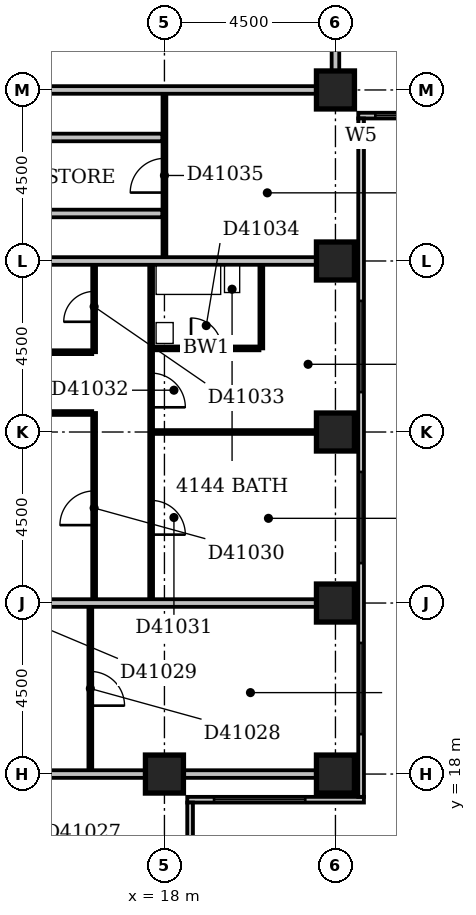
"""IFC4 building model, lengths in metres.
Left out: names, types, materials, properties, quantities, classifications, styles, units other than length and angle.
Written with IfcOpenShell. Run it as: python <this file> out.ifc"""

import sys

from ifc_helpers import new_model, si_unit, direction, frame, frame_2d, origin, origin_2d, place, context, subcontext, project, spatial, rectangle, extrude, element, fill, save


model = new_model("IFC4")
c1 = context("Model", 3, precision=1e-05, world=origin(), true_north=direction((0.0, 1.0)))
c2 = subcontext(c1, "Body", "Model", "MODEL_VIEW")
j1 = project(units=[si_unit("LENGTHUNIT", "METRE"), si_unit("PLANEANGLEUNIT", "RADIAN")], contexts=[c1])
p1 = place(None, origin())
s1 = spatial("IfcSite", under=j1, at=p1, CompositionType="ELEMENT")
p2 = place(p1, origin())
s2 = spatial("IfcBuilding", under=s1, at=p2, CompositionType="ELEMENT")
p3 = place(p2, frame((0.0, 0.0, 162.8)))
s3 = spatial("IfcBuildingStorey", under=s2, at=p3, CompositionType="ELEMENT", Elevation=162.8)
for number, where, z_axis, x_axis in (
    (1, (18.0, 18.0, -0.3), (0.0, 0.0, 1.0), (1.0, 0.0, 0.0)),
    (2, (22.5, 18.0, -0.3), (0.0, 0.0, 1.0), (1.0, 0.0, 0.0)),
    (3, (22.5, 22.5, -0.3), (0.0, 0.0, 1.0), (1.0, 0.0, 0.0)),
    (4, (22.5, 27.0, -0.3), (0.0, 0.0, 1.0), (1.0, 0.0, 0.0)),
    (5, (22.5, 31.5, -0.3), (0.0, 0.0, 1.0), (1.0, 0.0, 0.0)),
    (6, (22.5, 36.0, -0.3), (0.0, 0.0, 1.0), (1.0, 0.0, 0.0)),
):
    element("IfcColumn", number, at=place(p3, frame(where, z_axis=z_axis, x_axis=x_axis)), inside=s3, PredefinedType="COLUMN", context=c2, shape_type="SweptSolid", body=[
        extrude(rectangle(XDim=1.0, YDim=1.0, at=origin_2d()), origin(), (0.0, 0.0, 1.0), 3.6),
    ])
p4 = place(p3, frame((18.675, 8.4, 0.0), z_axis=(0.0, 0.0, 1.0), x_axis=(0.0, 1.0, 0.0)))
e7 = element("IfcWall", 7, at=p4, inside=s3, PredefinedType="STANDARD", context=c2, shape_type="SweptSolid", body=[
    extrude(rectangle(XDim=8.85, YDim=0.15, at=frame_2d((4.425, 0.0))), origin(), (0.0, 0.0, 1.0), 2.7),
])
p5 = place(p4, frame((1.65, 0.0, 0.6)))
e8 = element("IfcOpeningElement", 8, at=p5, cuts=e7, PredefinedType="OPENING", context=c2, shape_type="SweptSolid", body=[
    extrude(rectangle(XDim=2.4, YDim=1.8, at=frame_2d((1.2, 0.9))), frame((0.0, 0.087, 0.0), z_axis=(0.0, -1.0, 0.0), x_axis=(1.0, 0.0, 0.0)), (0.0, 0.0, 1.0), 0.174),
])
p6 = place(p4, frame((5.83, 0.0, 0.6)))
e9 = element("IfcOpeningElement", 9, at=p6, cuts=e7, PredefinedType="OPENING", context=c2, shape_type="SweptSolid", body=[
    extrude(rectangle(XDim=1.5, YDim=1.8, at=frame_2d((0.75, 0.9))), frame((0.0, 0.087, 0.0), z_axis=(0.0, -1.0, 0.0), x_axis=(1.0, 0.0, 0.0)), (0.0, 0.0, 1.0), 0.174),
])
p7 = place(p3, frame((18.6, 17.325, 0.0), z_axis=(0.0, 0.0, 1.0), x_axis=(1.0, 0.0, 0.0)))
e10 = element("IfcWall", 10, at=p7, inside=s3, PredefinedType="STANDARD", context=c2, shape_type="SweptSolid", body=[
    extrude(rectangle(XDim=4.65, YDim=0.15, at=frame_2d((2.325, 0.0))), origin(), (0.0, 0.0, 1.0), 2.7),
])
p8 = place(p7, frame((0.706, 0.0, 0.6)))
e11 = element("IfcOpeningElement", 11, at=p8, cuts=e10, PredefinedType="OPENING", context=c2, shape_type="SweptSolid", body=[
    extrude(rectangle(XDim=2.4, YDim=1.8, at=frame_2d((1.2, 0.9))), frame((0.0, 0.087, 0.0), z_axis=(0.0, -1.0, 0.0), x_axis=(1.0, 0.0, 0.0)), (0.0, 0.0, 1.0), 0.174),
])
p9 = place(p3, frame((23.175, 17.4, 0.0), z_axis=(0.0, 0.0, 1.0), x_axis=(0.0, 1.0, 0.0)))
e12 = element("IfcWall", 12, at=p9, inside=s3, PredefinedType="STANDARD", context=c2, shape_type="SweptSolid", body=[
    extrude(rectangle(XDim=17.85, YDim=0.15, at=frame_2d((8.925, 0.0))), origin(), (0.0, 0.0, 1.0), 2.7),
])
p10 = place(p9, frame((1.65, 0.0, 0.6)))
e13 = element("IfcOpeningElement", 13, at=p10, cuts=e12, PredefinedType="OPENING", context=c2, shape_type="SweptSolid", body=[
    extrude(rectangle(XDim=2.4, YDim=1.8, at=frame_2d((1.2, 0.9))), frame((0.0, 0.087, 0.0), z_axis=(0.0, -1.0, 0.0), x_axis=(1.0, 0.0, 0.0)), (0.0, 0.0, 1.0), 0.174),
])
p11 = place(p9, frame((6.15, 0.0, 0.6)))
e14 = element("IfcOpeningElement", 14, at=p11, cuts=e12, PredefinedType="OPENING", context=c2, shape_type="SweptSolid", body=[
    extrude(rectangle(XDim=2.4, YDim=1.8, at=frame_2d((1.2, 0.9))), frame((0.0, 0.087, 0.0), z_axis=(0.0, -1.0, 0.0), x_axis=(1.0, 0.0, 0.0)), (0.0, 0.0, 1.0), 0.174),
])
p12 = place(p9, frame((10.65, 0.0, 0.6)))
e15 = element("IfcOpeningElement", 15, at=p12, cuts=e12, PredefinedType="OPENING", context=c2, shape_type="SweptSolid", body=[
    extrude(rectangle(XDim=2.4, YDim=1.8, at=frame_2d((1.2, 0.9))), frame((0.0, 0.087, 0.0), z_axis=(0.0, -1.0, 0.0), x_axis=(1.0, 0.0, 0.0)), (0.0, 0.0, 1.0), 0.174),
])
p13 = place(p9, frame((17.152, 0.0, 0.6)))
e16 = element("IfcOpeningElement", 16, at=p13, cuts=e12, PredefinedType="OPENING", context=c2, shape_type="SweptSolid", body=[
    extrude(rectangle(XDim=0.45, YDim=1.8, at=frame_2d((0.225, 0.9))), frame((0.0, 0.087, 0.0), z_axis=(0.0, -1.0, 0.0), x_axis=(1.0, 0.0, 0.0)), (0.0, 0.0, 1.0), 0.174),
])
p14 = place(p3, frame((23.1, 35.325, 0.0), z_axis=(0.0, 0.0, 1.0), x_axis=(1.0, 0.0, 0.0)))
e17 = element("IfcWall", 17, at=p14, inside=s3, PredefinedType="STANDARD", context=c2, shape_type="SweptSolid", body=[
    extrude(rectangle(XDim=45.15, YDim=0.15, at=frame_2d((22.575, 0.0))), origin(), (0.0, 0.0, 1.0), 2.7),
])
p15 = place(p14, frame((0.45, 0.0, 0.6)))
e18 = element("IfcOpeningElement", 18, at=p15, cuts=e17, PredefinedType="OPENING", context=c2, shape_type="SweptSolid", body=[
    extrude(rectangle(XDim=2.4, YDim=1.8, at=frame_2d((1.2, 0.9))), frame((0.0, 0.087, 0.0), z_axis=(0.0, -1.0, 0.0), x_axis=(1.0, 0.0, 0.0)), (0.0, 0.0, 1.0), 0.174),
])
p16 = place(p14, frame((4.95, 0.0, 0.6)))
e19 = element("IfcOpeningElement", 19, at=p16, cuts=e17, PredefinedType="OPENING", context=c2, shape_type="SweptSolid", body=[
    extrude(rectangle(XDim=2.4, YDim=1.8, at=frame_2d((1.2, 0.9))), frame((0.0, 0.087, 0.0), z_axis=(0.0, -1.0, 0.0), x_axis=(1.0, 0.0, 0.0)), (0.0, 0.0, 1.0), 0.174),
])
p17 = place(p14, frame((9.167, 0.0, 0.6)))
e20 = element("IfcOpeningElement", 20, at=p17, cuts=e17, PredefinedType="OPENING", context=c2, shape_type="SweptSolid", body=[
    extrude(rectangle(XDim=1.8, YDim=1.8, at=frame_2d((0.9, 0.9))), frame((0.0, 0.087, 0.0), z_axis=(0.0, -1.0, 0.0), x_axis=(1.0, 0.0, 0.0)), (0.0, 0.0, 1.0), 0.174),
])
p18 = place(p14, frame((14.895, 0.0, 0.6)))
e21 = element("IfcOpeningElement", 21, at=p18, cuts=e17, PredefinedType="OPENING", context=c2, shape_type="SweptSolid", body=[
    extrude(rectangle(XDim=1.8, YDim=1.8, at=frame_2d((0.9, 0.9))), frame((0.0, 0.087, 0.0), z_axis=(0.0, -1.0, 0.0), x_axis=(1.0, 0.0, 0.0)), (0.0, 0.0, 1.0), 0.174),
])
p19 = place(p14, frame((18.45, 0.0, 0.6)))
e22 = element("IfcOpeningElement", 22, at=p19, cuts=e17, PredefinedType="OPENING", context=c2, shape_type="SweptSolid", body=[
    extrude(rectangle(XDim=2.4, YDim=1.8, at=frame_2d((1.2, 0.9))), frame((0.0, 0.087, 0.0), z_axis=(0.0, -1.0, 0.0), x_axis=(1.0, 0.0, 0.0)), (0.0, 0.0, 1.0), 0.174),
])
p20 = place(p14, frame((22.95, 0.0, 0.6)))
e23 = element("IfcOpeningElement", 23, at=p20, cuts=e17, PredefinedType="OPENING", context=c2, shape_type="SweptSolid", body=[
    extrude(rectangle(XDim=2.4, YDim=1.8, at=frame_2d((1.2, 0.9))), frame((0.0, 0.087, 0.0), z_axis=(0.0, -1.0, 0.0), x_axis=(1.0, 0.0, 0.0)), (0.0, 0.0, 1.0), 0.174),
])
p21 = place(p14, frame((27.45, 0.0, 0.6)))
e24 = element("IfcOpeningElement", 24, at=p21, cuts=e17, PredefinedType="OPENING", context=c2, shape_type="SweptSolid", body=[
    extrude(rectangle(XDim=2.4, YDim=1.8, at=frame_2d((1.2, 0.9))), frame((0.0, 0.087, 0.0), z_axis=(0.0, -1.0, 0.0), x_axis=(1.0, 0.0, 0.0)), (0.0, 0.0, 1.0), 0.174),
])
p22 = place(p14, frame((31.95, 0.0, 0.6)))
e25 = element("IfcOpeningElement", 25, at=p22, cuts=e17, PredefinedType="OPENING", context=c2, shape_type="SweptSolid", body=[
    extrude(rectangle(XDim=2.4, YDim=1.8, at=frame_2d((1.2, 0.9))), frame((0.0, 0.087, 0.0), z_axis=(0.0, -1.0, 0.0), x_axis=(1.0, 0.0, 0.0)), (0.0, 0.0, 1.0), 0.174),
])
p23 = place(p14, frame((36.45, 0.0, 0.6)))
e26 = element("IfcOpeningElement", 26, at=p23, cuts=e17, PredefinedType="OPENING", context=c2, shape_type="SweptSolid", body=[
    extrude(rectangle(XDim=2.4, YDim=1.8, at=frame_2d((1.2, 0.9))), frame((0.0, 0.087, 0.0), z_axis=(0.0, -1.0, 0.0), x_axis=(1.0, 0.0, 0.0)), (0.0, 0.0, 1.0), 0.174),
])
p24 = place(p14, frame((40.61, 0.0, 0.6)))
e27 = element("IfcOpeningElement", 27, at=p24, cuts=e17, PredefinedType="OPENING", context=c2, shape_type="SweptSolid", body=[
    extrude(rectangle(XDim=1.2, YDim=1.8, at=frame_2d((0.6, 0.9))), frame((0.0, 0.087, 0.0), z_axis=(0.0, -1.0, 0.0), x_axis=(1.0, 0.0, 0.0)), (0.0, 0.0, 1.0), 0.174),
])
p25 = place(p3, frame((9.1, 18.0, 0.0), z_axis=(0.0, 0.0, 1.0), x_axis=(1.0, 0.0, 0.0)))
e28 = element("IfcWall", 28, at=p25, inside=s3, PredefinedType="PARTITIONING", context=c2, shape_type="SweptSolid", body=[
    extrude(rectangle(XDim=8.4, YDim=0.2, at=frame_2d((4.2, 0.0))), origin(), (0.0, 0.0, 1.0), 2.6),
])
p26 = place(p3, frame((18.5, 18.0, 0.0), z_axis=(0.0, 0.0, 1.0), x_axis=(1.0, 0.0, 0.0)))
e29 = element("IfcWall", 29, at=p26, inside=s3, PredefinedType="PARTITIONING", context=c2, shape_type="SweptSolid", body=[
    extrude(rectangle(XDim=3.5, YDim=0.2, at=frame_2d((1.75, 0.0))), origin(), (0.0, 0.0, 1.0), 2.7),
])
p27 = place(p3, frame((16.05, 18.1, 0.0), z_axis=(0.0, 0.0, 1.0), x_axis=(0.0, 1.0, 0.0)))
e30 = element("IfcWall", 30, at=p27, inside=s3, PredefinedType="PARTITIONING", context=c2, shape_type="SweptSolid", body=[
    extrude(rectangle(XDim=4.3, YDim=0.1, at=frame_2d((2.15, 0.0))), origin(), (0.0, 0.0, 1.0), 3.3),
])
p28 = place(p27, frame((1.7, 0.0, 0.0)))
e31 = element("IfcOpeningElement", 31, at=p28, cuts=e30, PredefinedType="OPENING", context=c2, shape_type="SweptSolid", body=[
    extrude(rectangle(XDim=0.9, YDim=2.1, at=frame_2d((0.45, 1.05))), frame((0.0, 0.062, 0.0), z_axis=(0.0, -1.0, 0.0), x_axis=(1.0, 0.0, 0.0)), (0.0, 0.0, 1.0), 0.124),
])
p29 = place(p3, frame((9.1, 22.5, 0.0), z_axis=(0.0, 0.0, 1.0), x_axis=(1.0, 0.0, 0.0)))
e32 = element("IfcWall", 32, at=p29, inside=s3, PredefinedType="PARTITIONING", context=c2, shape_type="SweptSolid", body=[
    extrude(rectangle(XDim=12.9, YDim=0.2, at=frame_2d((6.45, 0.0))), origin(), (0.0, 0.0, 1.0), 3.3),
])
p30 = place(p3, frame((16.15, 22.6, 0.0), z_axis=(0.0, 0.0, 1.0), x_axis=(0.0, 1.0, 0.0)))
e33 = element("IfcWall", 33, at=p30, inside=s3, PredefinedType="PARTITIONING", context=c2, shape_type="SweptSolid", body=[
    extrude(rectangle(XDim=4.9, YDim=0.1, at=frame_2d((2.45, 0.0))), origin(), (0.0, 0.0, 1.0), 3.3),
])
p31 = place(p30, frame((1.95, 0.0, 0.0)))
e34 = element("IfcOpeningElement", 34, at=p31, cuts=e33, PredefinedType="OPENING", context=c2, shape_type="SweptSolid", body=[
    extrude(rectangle(XDim=0.9, YDim=2.1, at=frame_2d((0.45, 1.05))), frame((0.0, 0.062, 0.0), z_axis=(0.0, -1.0, 0.0), x_axis=(1.0, 0.0, 0.0)), (0.0, 0.0, 1.0), 0.124),
])
p32 = place(p3, frame((17.65, 22.6, 0.0), z_axis=(0.0, 0.0, 1.0), x_axis=(0.0, 1.0, 0.0)))
e35 = element("IfcWall", 35, at=p32, inside=s3, PredefinedType="PARTITIONING", context=c2, shape_type="SweptSolid", body=[
    extrude(rectangle(XDim=8.8, YDim=0.1, at=frame_2d((4.4, 0.0))), origin(), (0.0, 0.0, 1.0), 3.3),
])
p33 = place(p32, frame((1.7, 0.0, 0.0)))
e36 = element("IfcOpeningElement", 36, at=p33, cuts=e35, PredefinedType="OPENING", context=c2, shape_type="SweptSolid", body=[
    extrude(rectangle(XDim=0.9, YDim=2.1, at=frame_2d((0.45, 1.05))), frame((0.0, 0.062, 0.0), z_axis=(0.0, -1.0, 0.0), x_axis=(1.0, 0.0, 0.0)), (0.0, 0.0, 1.0), 0.124),
])
p34 = place(p32, frame((5.05, 0.0, 0.0)))
e37 = element("IfcOpeningElement", 37, at=p34, cuts=e35, PredefinedType="OPENING", context=c2, shape_type="SweptSolid", body=[
    extrude(rectangle(XDim=0.9, YDim=2.1, at=frame_2d((0.45, 1.05))), frame((0.0, 0.062, 0.0), z_axis=(0.0, -1.0, 0.0), x_axis=(1.0, 0.0, 0.0)), (0.0, 0.0, 1.0), 0.124),
])
p35 = place(p3, frame((17.7, 27.0, 0.0), z_axis=(0.0, 0.0, 1.0), x_axis=(1.0, 0.0, 0.0)))
e38 = element("IfcWall", 38, at=p35, inside=s3, PredefinedType="PARTITIONING", context=c2, shape_type="SweptSolid", body=[
    extrude(rectangle(XDim=4.3, YDim=0.1, at=frame_2d((2.15, 0.0))), origin(), (0.0, 0.0, 1.0), 2.7),
])
p36 = place(p3, frame((9.1, 27.5, 0.0), z_axis=(0.0, 0.0, 1.0), x_axis=(1.0, 0.0, 0.0)))
e39 = element("IfcWall", 39, at=p36, inside=s3, PredefinedType="PARTITIONING", context=c2, shape_type="SweptSolid", body=[
    extrude(rectangle(XDim=7.0, YDim=0.1, at=frame_2d((3.5, 0.0))), origin(), (0.0, 0.0, 1.0), 2.7),
])
p37 = place(p3, frame((9.1, 29.1, 0.0), z_axis=(0.0, 0.0, 1.0), x_axis=(1.0, 0.0, 0.0)))
e40 = element("IfcWall", 40, at=p37, inside=s3, PredefinedType="PLUMBINGWALL", context=c2, shape_type="SweptSolid", body=[
    extrude(rectangle(XDim=7.0, YDim=0.1, at=frame_2d((3.5, 0.0))), origin(), (0.0, 0.0, 1.0), 3.3),
])
p38 = place(p3, frame((16.15, 29.1, 0.0), z_axis=(0.0, 0.0, 1.0), x_axis=(0.0, 1.0, 0.0)))
e41 = element("IfcWall", 41, at=p38, inside=s3, PredefinedType="PARTITIONING", context=c2, shape_type="SweptSolid", body=[
    extrude(rectangle(XDim=2.3, YDim=0.1, at=frame_2d((1.15, 0.0))), origin(), (0.0, 0.0, 1.0), 3.3),
])
p39 = place(p38, frame((0.8, 0.0, 0.0)))
e42 = element("IfcOpeningElement", 42, at=p39, cuts=e41, PredefinedType="OPENING", context=c2, shape_type="SweptSolid", body=[
    extrude(rectangle(XDim=0.8, YDim=2.1, at=frame_2d((0.4, 1.05))), frame((0.0, 0.062, 0.0), z_axis=(0.0, -1.0, 0.0), x_axis=(1.0, 0.0, 0.0)), (0.0, 0.0, 1.0), 0.124),
])
p40 = place(p3, frame((17.7, 29.2, 0.0), z_axis=(0.0, 0.0, 1.0), x_axis=(1.0, 0.0, 0.0)))
e43 = element("IfcWall", 43, at=p40, inside=s3, PredefinedType="PLUMBINGWALL", context=c2, shape_type="SweptSolid", body=[
    extrude(rectangle(XDim=2.8, YDim=0.1, at=frame_2d((1.4, 0.0))), origin(), (0.0, 0.0, 1.0), 3.3),
])
p41 = place(p40, frame((1.0, 0.0, 0.0)))
e44 = element("IfcOpeningElement", 44, at=p41, cuts=e43, PredefinedType="OPENING", context=c2, shape_type="SweptSolid", body=[
    extrude(rectangle(XDim=0.8, YDim=2.1, at=frame_2d((0.4, 1.05))), frame((0.0, 0.062, 0.0), z_axis=(0.0, -1.0, 0.0), x_axis=(1.0, 0.0, 0.0)), (0.0, 0.0, 1.0), 0.124),
])
p42 = place(p3, frame((20.55, 29.2, 0.0), z_axis=(0.0, 0.0, 1.0), x_axis=(0.0, 1.0, 0.0)))
e45 = element("IfcWall", 45, at=p42, inside=s3, PredefinedType="PLUMBINGWALL", context=c2, shape_type="SweptSolid", body=[
    extrude(rectangle(XDim=2.2, YDim=0.1, at=frame_2d((1.1, 0.0))), origin(), (0.0, 0.0, 1.0), 3.3),
])
p43 = place(p3, frame((9.1, 31.5, 0.0), z_axis=(0.0, 0.0, 1.0), x_axis=(1.0, 0.0, 0.0)))
e46 = element("IfcWall", 46, at=p43, inside=s3, PredefinedType="PARTITIONING", context=c2, shape_type="SweptSolid", body=[
    extrude(rectangle(XDim=12.9, YDim=0.2, at=frame_2d((6.45, 0.0))), origin(), (0.0, 0.0, 1.0), 3.3),
])
p44 = place(p3, frame((18.0, 31.6, 0.0), z_axis=(0.0, 0.0, 1.0), x_axis=(0.0, 1.0, 0.0)))
e47 = element("IfcWall", 47, at=p44, inside=s3, PredefinedType="PARTITIONING", context=c2, shape_type="SweptSolid", body=[
    extrude(rectangle(XDim=4.3, YDim=0.1, at=frame_2d((2.15, 0.0))), origin(), (0.0, 0.0, 1.0), 3.3),
])
p45 = place(p44, frame((1.7, 0.0, 0.0)))
e48 = element("IfcOpeningElement", 48, at=p45, cuts=e47, PredefinedType="OPENING", context=c2, shape_type="SweptSolid", body=[
    extrude(rectangle(XDim=0.9, YDim=2.1, at=frame_2d((0.45, 1.05))), frame((0.0, 0.062, 0.0), z_axis=(0.0, -1.0, 0.0), x_axis=(1.0, 0.0, 0.0)), (0.0, 0.0, 1.0), 0.124),
])
p46 = place(p3, frame((9.1, 32.75, 0.0), z_axis=(0.0, 0.0, 1.0), x_axis=(1.0, 0.0, 0.0)))
e49 = element("IfcWall", 49, at=p46, inside=s3, PredefinedType="PARTITIONING", context=c2, shape_type="SweptSolid", body=[
    extrude(rectangle(XDim=8.85, YDim=0.2, at=frame_2d((4.425, 0.0))), origin(), (0.0, 0.0, 1.0), 3.3),
])
p47 = place(p46, frame((2.5, 0.0, 0.0)))
e50 = element("IfcOpeningElement", 50, at=p47, cuts=e49, PredefinedType="OPENING", context=c2, shape_type="SweptSolid", body=[
    extrude(rectangle(XDim=0.8, YDim=2.1, at=frame_2d((0.4, 1.05))), frame((0.0, 0.112, 0.0), z_axis=(0.0, -1.0, 0.0), x_axis=(1.0, 0.0, 0.0)), (0.0, 0.0, 1.0), 0.224),
])
p48 = place(p3, frame((9.1, 34.75, 0.0), z_axis=(0.0, 0.0, 1.0), x_axis=(1.0, 0.0, 0.0)))
e51 = element("IfcWall", 51, at=p48, inside=s3, PredefinedType="PARTITIONING", context=c2, shape_type="SweptSolid", body=[
    extrude(rectangle(XDim=8.85, YDim=0.2, at=frame_2d((4.425, 0.0))), origin(), (0.0, 0.0, 1.0), 3.3),
])
p49 = place(p48, frame((2.5, 0.0, 0.0)))
e52 = element("IfcOpeningElement", 52, at=p49, cuts=e51, PredefinedType="OPENING", context=c2, shape_type="SweptSolid", body=[
    extrude(rectangle(XDim=0.8, YDim=2.1, at=frame_2d((0.4, 1.05))), frame((0.0, 0.112, 0.0), z_axis=(0.0, -1.0, 0.0), x_axis=(1.0, 0.0, 0.0)), (0.0, 0.0, 1.0), 0.224),
])
for number, where, z_axis, x_axis in (
    (53, (9.1, 36.0, 0.0), (0.0, 0.0, 1.0), (1.0, 0.0, 0.0)),
    (54, (22.5, 36.5, 0.0), (0.0, 0.0, 1.0), (0.0, 1.0, 0.0)),
):
    element("IfcWall", number, at=place(p3, frame(where, z_axis=z_axis, x_axis=x_axis)), inside=s3, PredefinedType="PARTITIONING", context=c2, shape_type="SweptSolid", body=[
        extrude(rectangle(XDim=12.9, YDim=0.2, at=frame_2d((6.45, 0.0))), origin(), (0.0, 0.0, 1.0), 3.3),
    ])
p50 = place(p8, origin())
e55 = element("IfcWindow", 55, at=p50, inside=s3, PartitioningType="SINGLE_PANEL", PredefinedType="WINDOW", context=c2, shape_type="SweptSolid", body=[
    extrude(rectangle(XDim=2.4, YDim=1.8, at=frame_2d((1.2, 0.9))), frame((0.0, 0.03, 0.0), z_axis=(0.0, -1.0, 0.0), x_axis=(1.0, 0.0, 0.0)), (0.0, 0.0, 1.0), 0.06),
])
fill(e11, e55)
p51 = place(p10, origin())
e56 = element("IfcWindow", 56, at=p51, inside=s3, PartitioningType="SINGLE_PANEL", PredefinedType="WINDOW", context=c2, shape_type="SweptSolid", body=[
    extrude(rectangle(XDim=2.4, YDim=1.8, at=frame_2d((1.2, 0.9))), frame((0.0, 0.03, 0.0), z_axis=(0.0, -1.0, 0.0), x_axis=(1.0, 0.0, 0.0)), (0.0, 0.0, 1.0), 0.06),
])
fill(e13, e56)
p52 = place(p11, origin())
e57 = element("IfcWindow", 57, at=p52, inside=s3, PartitioningType="SINGLE_PANEL", PredefinedType="WINDOW", context=c2, shape_type="SweptSolid", body=[
    extrude(rectangle(XDim=2.4, YDim=1.8, at=frame_2d((1.2, 0.9))), frame((0.0, 0.03, 0.0), z_axis=(0.0, -1.0, 0.0), x_axis=(1.0, 0.0, 0.0)), (0.0, 0.0, 1.0), 0.06),
])
fill(e14, e57)
p53 = place(p12, origin())
e58 = element("IfcWindow", 58, at=p53, inside=s3, PartitioningType="SINGLE_PANEL", PredefinedType="WINDOW", context=c2, shape_type="SweptSolid", body=[
    extrude(rectangle(XDim=2.4, YDim=1.8, at=frame_2d((1.2, 0.9))), frame((0.0, 0.03, 0.0), z_axis=(0.0, -1.0, 0.0), x_axis=(1.0, 0.0, 0.0)), (0.0, 0.0, 1.0), 0.06),
])
fill(e15, e58)
p54 = place(p13, origin())
e59 = element("IfcWindow", 59, at=p54, inside=s3, PartitioningType="SINGLE_PANEL", PredefinedType="WINDOW", context=c2, shape_type="SweptSolid", body=[
    extrude(rectangle(XDim=0.45, YDim=1.8, at=frame_2d((0.225, 0.9))), frame((0.0, 0.03, 0.0), z_axis=(0.0, -1.0, 0.0), x_axis=(1.0, 0.0, 0.0)), (0.0, 0.0, 1.0), 0.06),
])
fill(e16, e59)
p55 = place(p15, origin())
e60 = element("IfcWindow", 60, at=p55, inside=s3, PartitioningType="SINGLE_PANEL", PredefinedType="WINDOW", context=c2, shape_type="SweptSolid", body=[
    extrude(rectangle(XDim=2.4, YDim=1.8, at=frame_2d((1.2, 0.9))), frame((0.0, 0.03, 0.0), z_axis=(0.0, -1.0, 0.0), x_axis=(1.0, 0.0, 0.0)), (0.0, 0.0, 1.0), 0.06),
])
fill(e18, e60)
p56 = place(p28, frame((0.9, 0.0, 0.0), z_axis=(0.0, 0.0, 1.0), x_axis=(-1.0, 0.0, 0.0)))
e61 = element("IfcDoor", 61, at=p56, inside=s3, OperationType="SINGLE_SWING_RIGHT", PredefinedType="DOOR", context=c2, shape_type="SweptSolid", body=[
    extrude(rectangle(XDim=0.9, YDim=2.1, at=frame_2d((0.45, 1.05))), frame((0.0, 0.025, 0.0), z_axis=(0.0, -1.0, 0.0), x_axis=(1.0, 0.0, 0.0)), (0.0, 0.0, 1.0), 0.05),
])
fill(e31, e61)
p57 = place(p31, origin())
e62 = element("IfcDoor", 62, at=p57, inside=s3, OperationType="SINGLE_SWING_LEFT", PredefinedType="DOOR", context=c2, shape_type="SweptSolid", body=[
    extrude(rectangle(XDim=0.9, YDim=2.1, at=frame_2d((0.45, 1.05))), frame((0.0, 0.025, 0.0), z_axis=(0.0, -1.0, 0.0), x_axis=(1.0, 0.0, 0.0)), (0.0, 0.0, 1.0), 0.05),
])
fill(e34, e62)
p58 = place(p33, frame((0.9, 0.0, 0.0), z_axis=(0.0, 0.0, 1.0), x_axis=(-1.0, 0.0, 0.0)))
e63 = element("IfcDoor", 63, at=p58, inside=s3, OperationType="SINGLE_SWING_RIGHT", PredefinedType="DOOR", context=c2, shape_type="SweptSolid", body=[
    extrude(rectangle(XDim=0.9, YDim=2.1, at=frame_2d((0.45, 1.05))), frame((0.0, 0.025, 0.0), z_axis=(0.0, -1.0, 0.0), x_axis=(1.0, 0.0, 0.0)), (0.0, 0.0, 1.0), 0.05),
])
fill(e36, e63)
p59 = place(p34, frame((0.9, 0.0, 0.0), z_axis=(0.0, 0.0, 1.0), x_axis=(-1.0, 0.0, 0.0)))
e64 = element("IfcDoor", 64, at=p59, inside=s3, OperationType="SINGLE_SWING_RIGHT", PredefinedType="DOOR", context=c2, shape_type="SweptSolid", body=[
    extrude(rectangle(XDim=0.9, YDim=2.1, at=frame_2d((0.45, 1.05))), frame((0.0, 0.025, 0.0), z_axis=(0.0, -1.0, 0.0), x_axis=(1.0, 0.0, 0.0)), (0.0, 0.0, 1.0), 0.05),
])
fill(e37, e64)
p60 = place(p39, origin())
e65 = element("IfcDoor", 65, at=p60, inside=s3, OperationType="SINGLE_SWING_LEFT", PredefinedType="DOOR", context=c2, shape_type="SweptSolid", body=[
    extrude(rectangle(XDim=0.8, YDim=2.1, at=frame_2d((0.4, 1.05))), frame((0.0, 0.025, 0.0), z_axis=(0.0, -1.0, 0.0), x_axis=(1.0, 0.0, 0.0)), (0.0, 0.0, 1.0), 0.05),
])
fill(e42, e65)
p61 = place(p41, origin())
e66 = element("IfcDoor", 66, at=p61, inside=s3, OperationType="SINGLE_SWING_LEFT", PredefinedType="DOOR", context=c2, shape_type="SweptSolid", body=[
    extrude(rectangle(XDim=0.8, YDim=2.1, at=frame_2d((0.4, 1.05))), frame((0.0, 0.025, 0.0), z_axis=(0.0, -1.0, 0.0), x_axis=(1.0, 0.0, 0.0)), (0.0, 0.0, 1.0), 0.05),
])
fill(e44, e66)
p62 = place(p45, origin())
e67 = element("IfcDoor", 67, at=p62, inside=s3, OperationType="SINGLE_SWING_LEFT", PredefinedType="DOOR", context=c2, shape_type="SweptSolid", body=[
    extrude(rectangle(XDim=0.9, YDim=2.1, at=frame_2d((0.45, 1.05))), frame((0.0, 0.025, 0.0), z_axis=(0.0, -1.0, 0.0), x_axis=(1.0, 0.0, 0.0)), (0.0, 0.0, 1.0), 0.05),
])
fill(e48, e67)
save(model, sys.argv[1])
